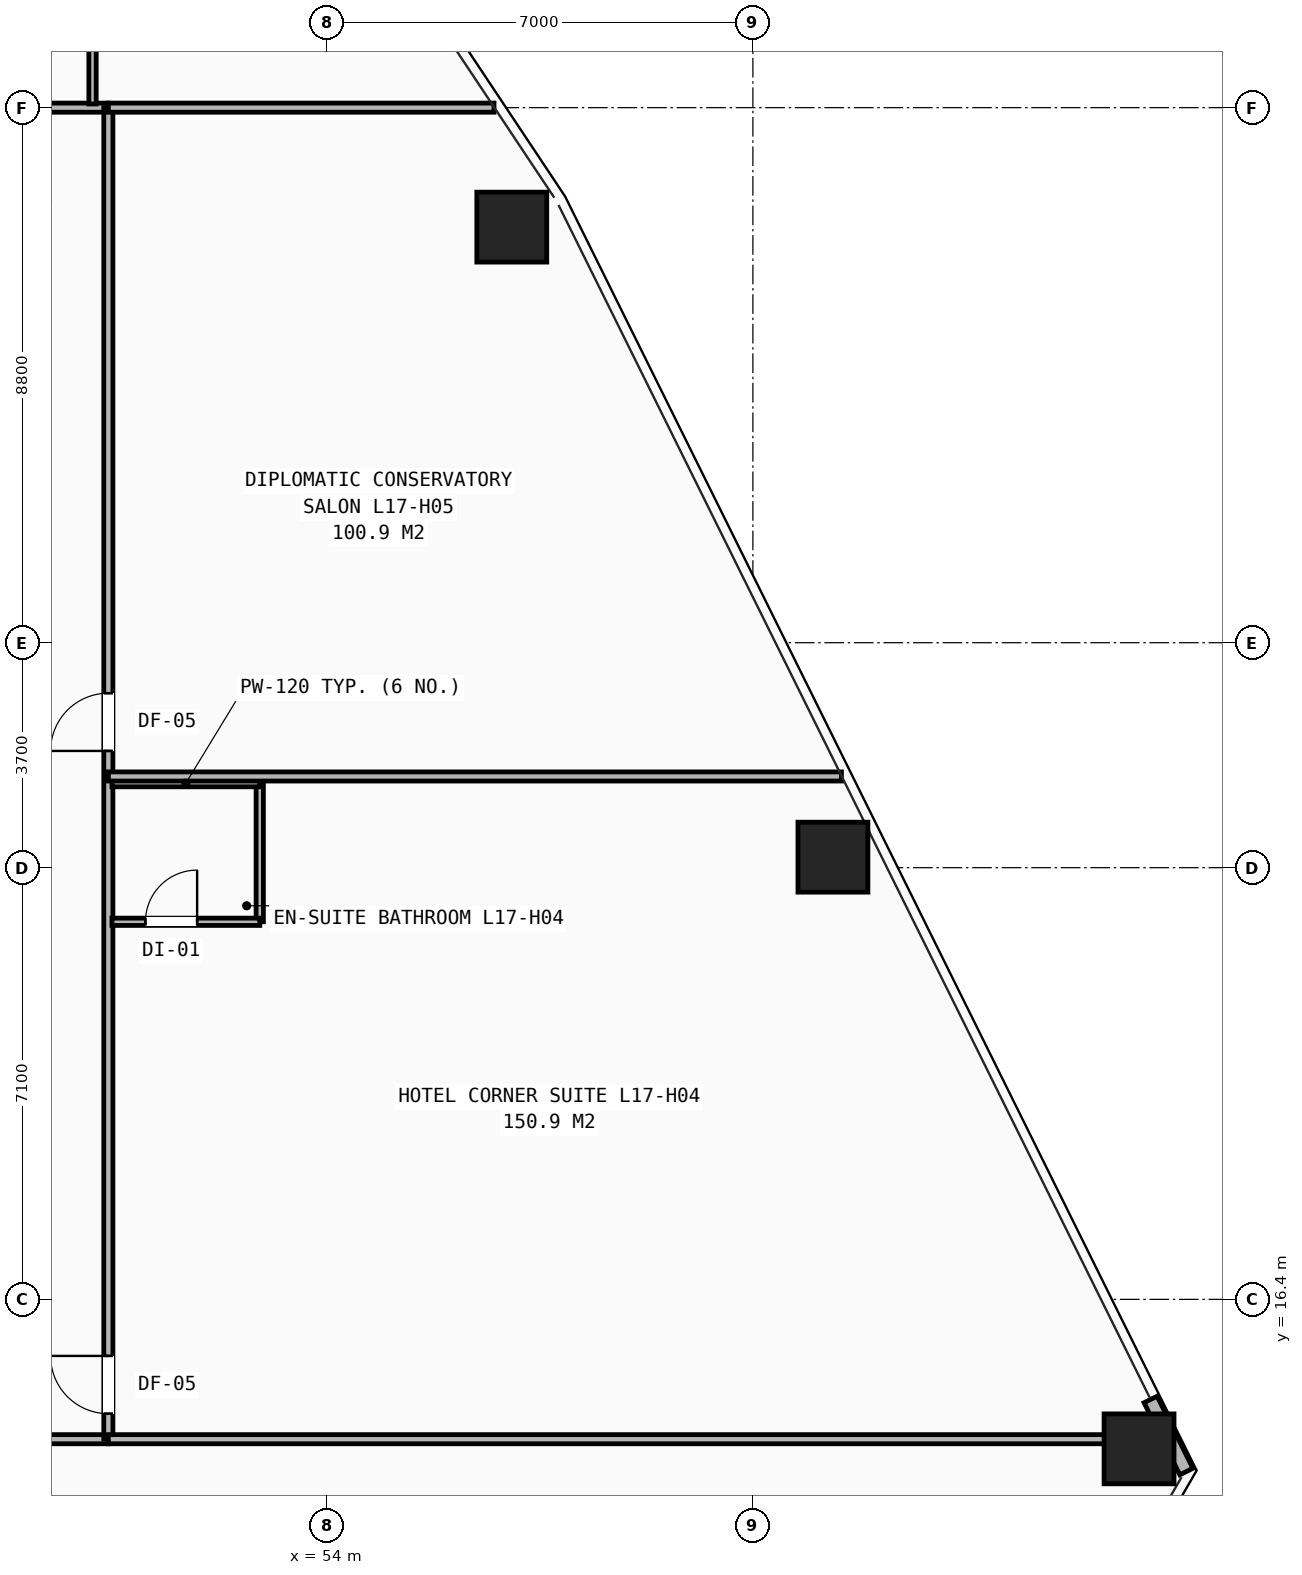
"""IFC4 building model, lengths in metres.
Left out: names, types, materials, properties, quantities, classifications, styles, units other than length and angle.
Written with IfcOpenShell. Run it as: python <this file> out.ifc"""

import sys

from ifc_helpers import new_model, si_unit, direction, frame, frame_2d, origin, origin_2d, place, context, subcontext, project, spatial, rectangle, hollow_rectangle, extrude, element, fill, save


model = new_model("IFC4")
c1 = context("Model", 3, precision=1e-05, world=origin(), true_north=direction((0.0, 1.0)))
c2 = subcontext(c1, "Body", "Model", "MODEL_VIEW")
j1 = project(units=[si_unit("LENGTHUNIT", "METRE"), si_unit("PLANEANGLEUNIT", "RADIAN")], contexts=[c1])
p1 = place(None, origin())
s1 = spatial("IfcSite", under=j1, at=p1, CompositionType="ELEMENT")
p2 = place(p1, origin())
s2 = spatial("IfcBuilding", under=s1, at=p2, CompositionType="ELEMENT")
p3 = place(p2, frame((0.0, 0.0, 62.4)))
s3 = spatial("IfcBuildingStorey", under=s2, at=p3, CompositionType="ELEMENT", Elevation=62.4)
for number, where, z_axis, x_axis in (
    (1, (67.351, 13.941, 0.0), (0.0, 0.0, 1.0), (1.0, 0.0, 0.0)),
    (2, (62.316, 23.673, 0.0), (0.0, 0.0, 1.0), (1.0, 0.0, 0.0)),
    (3, (57.035, 34.035, 0.0), (0.0, 0.0, 1.0), (1.0, 0.0, 0.0)),
):
    element("IfcColumn", number, at=place(p3, frame(where, z_axis=z_axis, x_axis=x_axis)), inside=s3, PredefinedType="COLUMN", context=c2, shape_type="SweptSolid", body=[
        extrude(hollow_rectangle(XDim=1.15, YDim=1.15, WallThickness=0.075, at=origin_2d()), origin(), (0.0, 0.0, 1.0), 3.2),
    ])
p4 = place(p3, frame((68.129, 13.568, 0.0), z_axis=(0.0, 0.0, 1.0), x_axis=(-0.444037765369, 0.896008070793, 0.0)))
e4 = element("IfcWall", 4, at=p4, inside=s3, PredefinedType="SHEAR", context=c2, shape_type="SweptSolid", body=[
    extrude(rectangle(XDim=1.323, YDim=0.24, at=frame_2d((0.662, 0.0))), origin(), (0.0, 0.0, 1.0), 2.263),
])
p5 = place(p3, frame((29.6, 14.1, 0.0), z_axis=(0.0, 0.0, 1.0), x_axis=(1.0, 0.0, 0.0)))
e5 = element("IfcWall", 5, at=p5, inside=s3, PredefinedType="PARTITIONING", context=c2, shape_type="SweptSolid", body=[
    extrude(rectangle(XDim=20.8, YDim=0.15, at=frame_2d((10.4, 0.0))), origin(), (0.0, 0.0, 1.0), 2.431),
])
p6 = place(p5, frame((0.57, 0.0, 0.0)))
e6 = element("IfcOpeningElement", 6, at=p6, cuts=e5, PredefinedType="OPENING", context=c2, shape_type="SweptSolid", body=[
    extrude(rectangle(XDim=0.95, YDim=2.1, at=frame_2d((0.475, 1.05))), frame((0.0, 0.085, 0.0), z_axis=(0.0, -1.0, 0.0), x_axis=(1.0, 0.0, 0.0)), (0.0, 0.0, 1.0), 0.17),
])
p7 = place(p5, frame((9.32, 0.0, 0.0)))
e7 = element("IfcOpeningElement", 7, at=p7, cuts=e5, PredefinedType="OPENING", context=c2, shape_type="SweptSolid", body=[
    extrude(rectangle(XDim=0.95, YDim=2.1, at=frame_2d((0.475, 1.05))), frame((0.0, 0.085, 0.0), z_axis=(0.0, -1.0, 0.0), x_axis=(1.0, 0.0, 0.0)), (0.0, 0.0, 1.0), 0.17),
])
p8 = place(p3, frame((40.75, 36.0, 0.0), z_axis=(0.0, 0.0, 1.0), x_axis=(1.0, 0.0, 0.0)))
e8 = element("IfcWall", 8, at=p8, inside=s3, PredefinedType="PARTITIONING", context=c2, shape_type="SweptSolid", body=[
    extrude(rectangle(XDim=9.65, YDim=0.15, at=frame_2d((4.825, 0.0))), origin(), (0.0, 0.0, 1.0), 2.513),
])
p9 = place(p8, frame((0.17, 0.0, 0.0)))
e9 = element("IfcOpeningElement", 9, at=p9, cuts=e8, PredefinedType="OPENING", context=c2, shape_type="SweptSolid", body=[
    extrude(rectangle(XDim=0.95, YDim=2.1, at=frame_2d((0.475, 1.05))), frame((0.0, 0.085, 0.0), z_axis=(0.0, -1.0, 0.0), x_axis=(1.0, 0.0, 0.0)), (0.0, 0.0, 1.0), 0.17),
])
p10 = place(p3, frame((50.4, 14.1, 0.0), z_axis=(0.0, 0.0, 1.0), x_axis=(0.0, 1.0, 0.0)))
e10 = element("IfcWall", 10, at=p10, inside=s3, PredefinedType="PARTITIONING", context=c2, shape_type="SweptSolid", body=[
    extrude(rectangle(XDim=21.9, YDim=0.15, at=frame_2d((10.95, 0.0))), origin(), (0.0, 0.0, 1.0), 2.431),
])
p11 = place(p10, frame((0.42, 0.0, 0.0)))
e11 = element("IfcOpeningElement", 11, at=p11, cuts=e10, PredefinedType="OPENING", context=c2, shape_type="SweptSolid", body=[
    extrude(rectangle(XDim=0.95, YDim=2.1, at=frame_2d((0.475, 1.05))), frame((0.0, 0.085, 0.0), z_axis=(0.0, -1.0, 0.0), x_axis=(1.0, 0.0, 0.0)), (0.0, 0.0, 1.0), 0.17),
])
p12 = place(p10, frame((11.32, 0.0, 0.0)))
e12 = element("IfcOpeningElement", 12, at=p12, cuts=e10, PredefinedType="OPENING", context=c2, shape_type="SweptSolid", body=[
    extrude(rectangle(XDim=0.95, YDim=2.1, at=frame_2d((0.475, 1.05))), frame((0.0, 0.085, 0.0), z_axis=(0.0, -1.0, 0.0), x_axis=(1.0, 0.0, 0.0)), (0.0, 0.0, 1.0), 0.17),
])
p13 = place(p3, frame((50.4, 14.1, 0.0), z_axis=(0.0, 0.0, 1.0), x_axis=(1.0, 0.0, 0.0)))
e13 = element("IfcWall", 13, at=p13, inside=s3, PredefinedType="PARTITIONING", context=c2, shape_type="SweptSolid", body=[
    extrude(rectangle(XDim=17.459, YDim=0.15, at=frame_2d((8.73, 0.0))), origin(), (0.0, 0.0, 1.0), 2.268),
])
p14 = place(p3, frame((50.4, 36.0, 0.0), z_axis=(0.0, 0.0, 1.0), x_axis=(1.0, 0.0, 0.0)))
e14 = element("IfcWall", 14, at=p14, inside=s3, PredefinedType="PARTITIONING", context=c2, shape_type="SweptSolid", body=[
    extrude(rectangle(XDim=6.343, YDim=0.15, at=frame_2d((3.171, 0.0))), origin(), (0.0, 0.0, 1.0), 2.268),
])
p15 = place(p3, frame((52.89, 22.61, 0.0), z_axis=(0.0, 0.0, 1.0), x_axis=(0.0, 1.0, 0.0)))
e15 = element("IfcWall", 15, at=p15, inside=s3, PredefinedType="PARTITIONING", context=c2, shape_type="SweptSolid", body=[
    extrude(rectangle(XDim=2.28, YDim=0.12, at=frame_2d((1.14, 0.0))), origin(), (0.0, 0.0, 1.0), 2.98),
])
p16 = place(p3, frame((50.46, 22.61, 0.0), z_axis=(0.0, 0.0, 1.0), x_axis=(1.0, 0.0, 0.0)))
e16 = element("IfcWall", 16, at=p16, inside=s3, PredefinedType="PARTITIONING", context=c2, shape_type="SweptSolid", body=[
    extrude(rectangle(XDim=2.43, YDim=0.12, at=frame_2d((1.215, 0.0))), origin(), (0.0, 0.0, 1.0), 2.98),
])
p17 = place(p16, frame((0.55, 0.0, 0.0)))
e17 = element("IfcOpeningElement", 17, at=p17, cuts=e16, PredefinedType="OPENING", context=c2, shape_type="SweptSolid", body=[
    extrude(rectangle(XDim=0.85, YDim=2.05, at=frame_2d((0.425, 1.025))), frame((0.0, 0.07, 0.0), z_axis=(0.0, -1.0, 0.0), x_axis=(1.0, 0.0, 0.0)), (0.0, 0.0, 1.0), 0.14),
])
p18 = place(p3, frame((50.46, 24.89, 0.0), z_axis=(0.0, 0.0, 1.0), x_axis=(1.0, 0.0, 0.0)))
e18 = element("IfcWall", 18, at=p18, inside=s3, PredefinedType="PARTITIONING", context=c2, shape_type="SweptSolid", body=[
    extrude(rectangle(XDim=2.43, YDim=0.12, at=frame_2d((1.215, 0.0))), origin(), (0.0, 0.0, 1.0), 2.98),
])
p19 = place(p3, frame((50.4, 25.0, 0.0), z_axis=(0.0, 0.0, 1.0), x_axis=(1.0, 0.0, 0.0)))
e19 = element("IfcWall", 19, at=p19, inside=s3, PredefinedType="PARTITIONING", context=c2, shape_type="SweptSolid", body=[
    extrude(rectangle(XDim=12.056, YDim=0.15, at=frame_2d((6.028, 0.0))), origin(), (0.0, 0.0, 1.0), 2.268),
])
p20 = place(p3, frame((50.14, 36.06, 0.0), z_axis=(0.0, 0.0, 1.0), x_axis=(0.0, 1.0, 0.0)))
e20 = element("IfcWall", 20, at=p20, inside=s3, PredefinedType="PARTITIONING", context=c2, shape_type="SweptSolid", body=[
    extrude(rectangle(XDim=2.43, YDim=0.12, at=frame_2d((1.215, 0.0))), origin(), (0.0, 0.0, 1.0), 2.513),
])
p21 = place(p11, origin())
e21 = element("IfcDoor", 21, at=p21, inside=s3, OperationType="SINGLE_SWING_RIGHT", PredefinedType="DOOR", context=c2, shape_type="SweptSolid", body=[
    extrude(rectangle(XDim=0.95, YDim=2.1, at=frame_2d((0.475, 1.05))), frame((0.0, 0.025, 0.0), z_axis=(0.0, -1.0, 0.0), x_axis=(1.0, 0.0, 0.0)), (0.0, 0.0, 1.0), 0.05),
])
fill(e11, e21)
p22 = place(p17, origin())
e22 = element("IfcDoor", 22, at=p22, inside=s3, OperationType="SINGLE_SWING_RIGHT", PredefinedType="DOOR", context=c2, shape_type="SweptSolid", body=[
    extrude(rectangle(XDim=0.85, YDim=2.05, at=frame_2d((0.425, 1.025))), frame((0.0, 0.025, 0.0), z_axis=(0.0, -1.0, 0.0), x_axis=(1.0, 0.0, 0.0)), (0.0, 0.0, 1.0), 0.05),
])
fill(e17, e22)
p23 = place(p12, origin())
e23 = element("IfcDoor", 23, at=p23, inside=s3, OperationType="SINGLE_SWING_LEFT", PredefinedType="DOOR", context=c2, shape_type="SweptSolid", body=[
    extrude(rectangle(XDim=0.95, YDim=2.1, at=frame_2d((0.475, 1.05))), frame((0.0, 0.025, 0.0), z_axis=(0.0, -1.0, 0.0), x_axis=(1.0, 0.0, 0.0)), (0.0, 0.0, 1.0), 0.05),
])
fill(e12, e23)
save(model, sys.argv[1])
